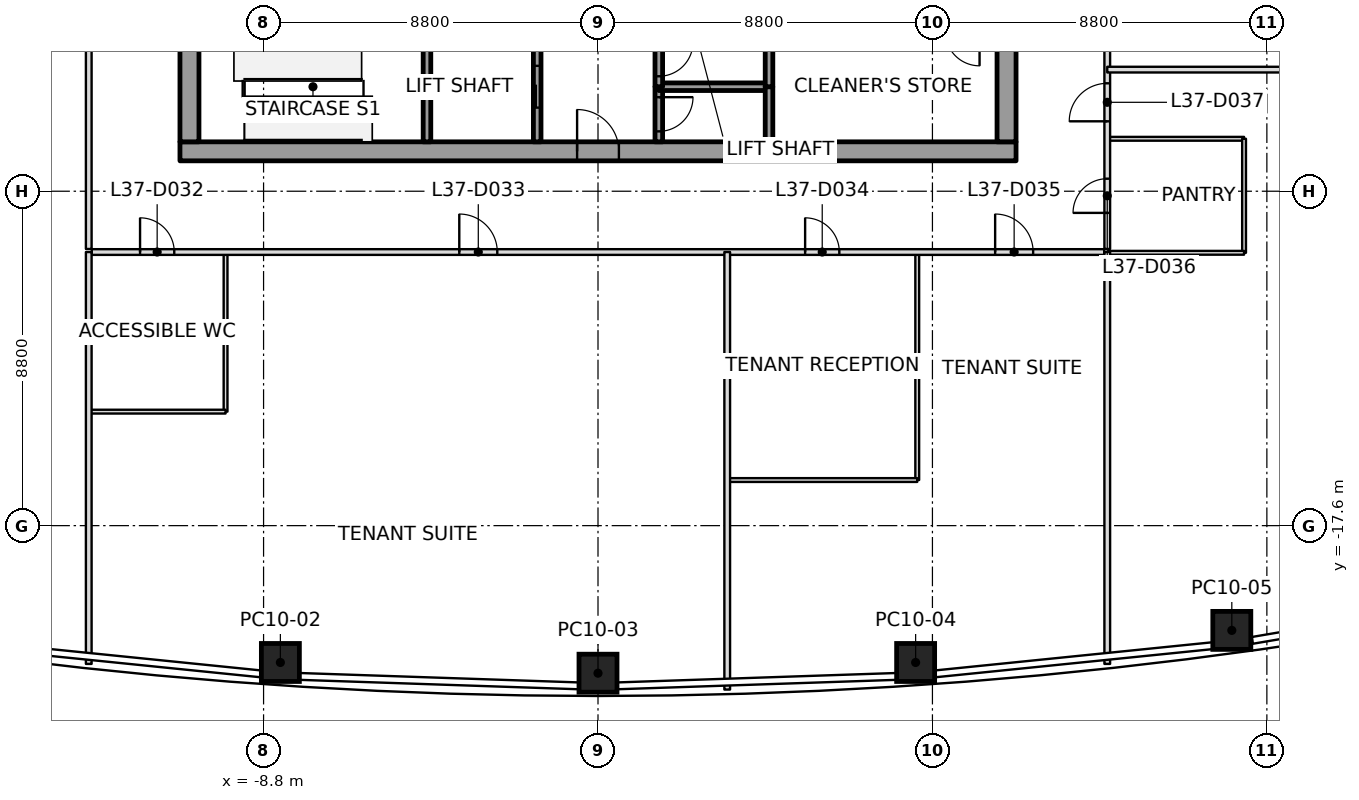
"""IFC4 building model, lengths in metres.
Left out: names, types, materials, properties, quantities, classifications, styles, units other than length and angle.
Written with IfcOpenShell. Run it as: python <this file> out.ifc"""

import sys

from ifc_helpers import new_model, si_unit, direction, frame, frame_2d, origin, origin_2d, place, context, subcontext, project, spatial, rectangle, extrude, element, fill, save


model = new_model("IFC4")
c1 = context("Model", 3, precision=1e-05, world=origin(), true_north=direction((0.0, 1.0)))
c2 = subcontext(c1, "Body", "Model", "MODEL_VIEW")
j1 = project(units=[si_unit("LENGTHUNIT", "METRE"), si_unit("PLANEANGLEUNIT", "RADIAN")], contexts=[c1])
p1 = place(None, origin())
s1 = spatial("IfcSite", under=j1, at=p1, CompositionType="ELEMENT")
p2 = place(p1, origin())
s2 = spatial("IfcBuilding", under=s1, at=p2, CompositionType="ELEMENT")
p3 = place(p2, frame((0.0, 0.0, 169.8)))
s3 = spatial("IfcBuildingStorey", under=s2, at=p3, CompositionType="ELEMENT", Elevation=169.8)
p4 = place(p3, frame((-8.358, -21.201, 0.0), z_axis=(0.008849199152, 0.01116829962, 0.999898475225), x_axis=(-0.99768763363, 0.067484561541, 0.008075868659)))
e1 = element("IfcColumn", 1, at=p4, inside=s3, PredefinedType="COLUMN", context=c2, shape_type="SweptSolid", body=[
    extrude(rectangle(XDim=1.0, YDim=1.0, at=origin_2d()), origin(), (0.0, 0.0, 1.0), 4.0),
])
p5 = place(p3, frame((0.0, -21.483, 0.0), z_axis=(0.0, 0.011473854038, 0.99993417317), x_axis=(1.0, 0.0, 0.0)))
e2 = element("IfcColumn", 2, at=p5, inside=s3, PredefinedType="COLUMN", context=c2, shape_type="SweptSolid", body=[
    extrude(rectangle(XDim=1.0, YDim=1.0, at=origin_2d()), origin(), (0.0, 0.0, 1.0), 4.0),
])
p6 = place(p3, frame((8.358, -21.201, 0.0), z_axis=(-0.008849199152, 0.01116829962, 0.999898475225), x_axis=(0.99768763363, 0.067484561541, 0.008075868659)))
e3 = element("IfcColumn", 3, at=p6, inside=s3, PredefinedType="COLUMN", context=c2, shape_type="SweptSolid", body=[
    extrude(rectangle(XDim=1.0, YDim=1.0, at=origin_2d()), origin(), (0.0, 0.0, 1.0), 4.0),
])
p7 = place(p3, frame((16.677, -20.356, 0.0), z_axis=(-0.017635456472, 0.010434820265, 0.999790030557), x_axis=(0.990763029768, 0.134648970227, 0.016070894879)))
e4 = element("IfcColumn", 4, at=p7, inside=s3, PredefinedType="COLUMN", context=c2, shape_type="SweptSolid", body=[
    extrude(rectangle(XDim=1.0, YDim=1.0, at=origin_2d()), origin(), (0.0, 0.0, 1.0), 4.001),
])
p8 = place(p3, frame((-11.0, -7.75, 0.0), z_axis=(0.0, 0.0, 1.0), x_axis=(1.0, 0.0, 0.0)))
e5 = element("IfcWall", 5, at=p8, inside=s3, PredefinedType="SHEAR", context=c2, shape_type="SweptSolid", body=[
    extrude(rectangle(XDim=22.0, YDim=0.5, at=frame_2d((11.0, 0.0))), origin(), (0.0, 0.0, 1.0), 4.0),
])
p9 = place(p8, frame((10.45, 0.0, 0.0)))
e6 = element("IfcOpeningElement", 6, at=p9, cuts=e5, PredefinedType="OPENING", context=c2, shape_type="SweptSolid", body=[
    extrude(rectangle(XDim=1.1, YDim=2.1, at=frame_2d((0.55, 1.05))), frame((0.0, 0.25, 0.0), z_axis=(0.0, -1.0, 0.0), x_axis=(1.0, 0.0, 0.0)), (0.0, 0.0, 1.0), 0.5),
])
p10 = place(p3, frame((-10.75, -7.5, 0.0), z_axis=(0.0, 0.0, 1.0), x_axis=(0.0, 1.0, 0.0)))
e7 = element("IfcWall", 7, at=p10, inside=s3, PredefinedType="SHEAR", context=c2, shape_type="SweptSolid", body=[
    extrude(rectangle(XDim=15.0, YDim=0.5, at=frame_2d((7.5, 0.0))), origin(), (0.0, 0.0, 1.0), 4.0),
])
p11 = place(p10, frame((6.6, 0.0, 0.0)))
e8 = element("IfcOpeningElement", 8, at=p11, cuts=e7, PredefinedType="OPENING", context=c2, shape_type="SweptSolid", body=[
    extrude(rectangle(XDim=1.8, YDim=2.1, at=frame_2d((0.9, 1.05))), frame((0.0, 0.25, 0.0), z_axis=(0.0, -1.0, 0.0), x_axis=(1.0, 0.0, 0.0)), (0.0, 0.0, 1.0), 0.5),
])
p12 = place(p3, frame((10.75, -7.5, 0.0), z_axis=(0.0, 0.0, 1.0), x_axis=(0.0, 1.0, 0.0)))
e9 = element("IfcWall", 9, at=p12, inside=s3, PredefinedType="SHEAR", context=c2, shape_type="SweptSolid", body=[
    extrude(rectangle(XDim=15.0, YDim=0.5, at=frame_2d((7.5, 0.0))), origin(), (0.0, 0.0, 1.0), 4.0),
])
p13 = place(p12, frame((6.6, 0.0, 0.0)))
e10 = element("IfcOpeningElement", 10, at=p13, cuts=e9, PredefinedType="OPENING", context=c2, shape_type="SweptSolid", body=[
    extrude(rectangle(XDim=1.8, YDim=2.1, at=frame_2d((0.9, 1.05))), frame((0.0, 0.25, 0.0), z_axis=(0.0, -1.0, 0.0), x_axis=(1.0, 0.0, 0.0)), (0.0, 0.0, 1.0), 0.5),
])
p14 = place(p3, frame((-4.5, -4.6, 0.0), z_axis=(0.0, 0.0, 1.0), x_axis=(0.0, -1.0, 0.0)))
e11 = element("IfcWall", 11, at=p14, inside=s3, PredefinedType="SOLIDWALL", context=c2, shape_type="SweptSolid", body=[
    extrude(rectangle(XDim=2.9, YDim=0.2, at=frame_2d((1.45, 0.0))), origin(), (0.0, 0.0, 1.0), 3.85),
])
p15 = place(p3, frame((-1.6, -7.5, 0.0), z_axis=(0.0, 0.0, 1.0), x_axis=(0.0, 1.0, 0.0)))
e12 = element("IfcWall", 12, at=p15, inside=s3, PredefinedType="SOLIDWALL", context=c2, shape_type="SweptSolid", body=[
    extrude(rectangle(XDim=2.9, YDim=0.2, at=frame_2d((1.45, 0.0))), origin(), (0.0, 0.0, 1.0), 3.85),
])
p16 = place(p15, frame((0.9, 0.0, 0.0)))
e13 = element("IfcOpeningElement", 13, at=p16, cuts=e12, PredefinedType="OPENING", context=c2, shape_type="SweptSolid", body=[
    extrude(rectangle(XDim=1.1, YDim=2.1, at=frame_2d((0.55, 1.05))), frame((0.0, 0.1, 0.0), z_axis=(0.0, -1.0, 0.0), x_axis=(1.0, 0.0, 0.0)), (0.0, 0.0, 1.0), 0.2),
])
p17 = place(p3, frame((1.6, -6.05, 0.0), z_axis=(0.0, 0.0, 1.0), x_axis=(0.0, -1.0, 0.0)))
e14 = element("IfcWall", 14, at=p17, inside=s3, PredefinedType="SOLIDWALL", context=c2, shape_type="SweptSolid", body=[
    extrude(rectangle(XDim=1.45, YDim=0.2, at=frame_2d((0.725, 0.0))), origin(), (0.0, 0.0, 1.0), 3.85),
])
p18 = place(p17, frame((0.275, 0.0, 0.0)))
e15 = element("IfcOpeningElement", 15, at=p18, cuts=e14, PredefinedType="OPENING", context=c2, shape_type="SweptSolid", body=[
    extrude(rectangle(XDim=0.9, YDim=2.1, at=frame_2d((0.45, 1.05))), frame((0.0, 0.1, 0.0), z_axis=(0.0, -1.0, 0.0), x_axis=(1.0, 0.0, 0.0)), (0.0, 0.0, 1.0), 0.2),
])
p19 = place(p3, frame((4.5, -6.05, 0.0), z_axis=(0.0, 0.0, 1.0), x_axis=(-1.0, 0.0, 0.0)))
e16 = element("IfcWall", 16, at=p19, inside=s3, PredefinedType="SOLIDWALL", context=c2, shape_type="SweptSolid", body=[
    extrude(rectangle(XDim=2.9, YDim=0.2, at=frame_2d((1.45, 0.0))), origin(), (0.0, 0.0, 1.0), 3.85),
])
p20 = place(p3, frame((1.6, -4.6, 0.0), z_axis=(0.0, 0.0, 1.0), x_axis=(0.0, -1.0, 0.0)))
e17 = element("IfcWall", 17, at=p20, inside=s3, PredefinedType="SOLIDWALL", context=c2, shape_type="SweptSolid", body=[
    extrude(rectangle(XDim=1.45, YDim=0.2, at=frame_2d((0.725, 0.0))), origin(), (0.0, 0.0, 1.0), 3.85),
])
p21 = place(p20, frame((0.275, 0.0, 0.0)))
e18 = element("IfcOpeningElement", 18, at=p21, cuts=e17, PredefinedType="OPENING", context=c2, shape_type="SweptSolid", body=[
    extrude(rectangle(XDim=0.9, YDim=2.1, at=frame_2d((0.45, 1.05))), frame((0.0, 0.1, 0.0), z_axis=(0.0, -1.0, 0.0), x_axis=(1.0, 0.0, 0.0)), (0.0, 0.0, 1.0), 0.2),
])
for number, where, z_axis, x_axis in (
    (19, (4.5, -6.05, 0.0), (0.0, 0.0, 1.0), (0.0, -1.0, 0.0)),
    (20, (4.5, -4.6, 0.0), (0.0, 0.0, 1.0), (0.0, -1.0, 0.0)),
):
    element("IfcWall", number, at=place(p3, frame(where, z_axis=z_axis, x_axis=x_axis)), inside=s3, PredefinedType="SOLIDWALL", context=c2, shape_type="SweptSolid", body=[
        extrude(rectangle(XDim=1.45, YDim=0.2, at=frame_2d((0.725, 0.0))), origin(), (0.0, 0.0, 1.0), 3.85),
    ])
p22 = place(p3, frame((-13.4, -10.4, 0.0), z_axis=(0.0, 0.0, 1.0), x_axis=(0.0, -1.0, 0.0)))
e21 = element("IfcWall", 21, at=p22, inside=s3, PredefinedType="PARTITIONING", context=c2, shape_type="SweptSolid", body=[
    extrude(rectangle(XDim=10.839, YDim=0.15, at=frame_2d((5.419, 0.0))), origin(), (0.0, 0.0, 1.0), 3.234),
])
p23 = place(p3, frame((3.4, -10.4, 0.0), z_axis=(0.0, 0.0, 1.0), x_axis=(0.0, -1.0, 0.0)))
e22 = element("IfcWall", 22, at=p23, inside=s3, PredefinedType="PARTITIONING", context=c2, shape_type="SweptSolid", body=[
    extrude(rectangle(XDim=11.514, YDim=0.15, at=frame_2d((5.757, 0.0))), origin(), (0.0, 0.0, 1.0), 3.234),
])
p24 = place(p3, frame((13.4, -10.4, 0.0), z_axis=(0.0, 0.0, 1.0), x_axis=(0.0, -1.0, 0.0)))
e23 = element("IfcWall", 23, at=p24, inside=s3, PredefinedType="PARTITIONING", context=c2, shape_type="SweptSolid", body=[
    extrude(rectangle(XDim=10.839, YDim=0.15, at=frame_2d((5.419, 0.0))), origin(), (0.0, 0.0, 1.0), 3.234),
])
p25 = place(p3, frame((27.018, -5.6, 0.0), z_axis=(0.0, 0.0, 1.0), x_axis=(-1.0, 0.0, 0.0)))
e24 = element("IfcWall", 24, at=p25, inside=s3, PredefinedType="PARTITIONING", context=c2, shape_type="SweptSolid", body=[
    extrude(rectangle(XDim=13.618, YDim=0.15, at=frame_2d((6.809, 0.0))), origin(), (0.0, 0.0, 1.0), 3.234),
])
p26 = place(p3, frame((-13.4, 10.32, 0.0), z_axis=(0.0, 0.0, 1.0), x_axis=(0.0, -1.0, 0.0)))
e25 = element("IfcWall", 25, at=p26, inside=s3, PredefinedType="PARTITIONING", context=c2, shape_type="SweptSolid", body=[
    extrude(rectangle(XDim=20.64, YDim=0.15, at=frame_2d((10.32, 0.0))), origin(), (0.0, 0.0, 1.0), 3.166),
])
p27 = place(p26, frame((1.57, 0.0, 0.0)))
e26 = element("IfcOpeningElement", 26, at=p27, cuts=e25, PredefinedType="OPENING", context=c2, shape_type="SweptSolid", body=[
    extrude(rectangle(XDim=0.9, YDim=2.1, at=frame_2d((0.45, 1.05))), frame((0.0, 0.075, 0.0), z_axis=(0.0, -1.0, 0.0), x_axis=(1.0, 0.0, 0.0)), (0.0, 0.0, 1.0), 0.15),
])
p28 = place(p26, frame((11.98, 0.0, 0.0)))
e27 = element("IfcOpeningElement", 27, at=p28, cuts=e25, PredefinedType="OPENING", context=c2, shape_type="SweptSolid", body=[
    extrude(rectangle(XDim=1.0, YDim=2.1, at=frame_2d((0.5, 1.05))), frame((0.0, 0.075, 0.0), z_axis=(0.0, -1.0, 0.0), x_axis=(1.0, 0.0, 0.0)), (0.0, 0.0, 1.0), 0.15),
])
p29 = place(p3, frame((-13.32, -10.4, 0.0), z_axis=(0.0, 0.0, 1.0), x_axis=(1.0, 0.0, 0.0)))
e28 = element("IfcWall", 28, at=p29, inside=s3, PredefinedType="PARTITIONING", context=c2, shape_type="SweptSolid", body=[
    extrude(rectangle(XDim=26.64, YDim=0.15, at=frame_2d((13.32, 0.0))), origin(), (0.0, 0.0, 1.0), 3.3),
])
p30 = place(p29, frame((1.27, 0.0, 0.0)))
e29 = element("IfcOpeningElement", 29, at=p30, cuts=e28, PredefinedType="OPENING", context=c2, shape_type="SweptSolid", body=[
    extrude(rectangle(XDim=0.9, YDim=2.1, at=frame_2d((0.45, 1.05))), frame((0.0, 0.075, 0.0), z_axis=(0.0, -1.0, 0.0), x_axis=(1.0, 0.0, 0.0)), (0.0, 0.0, 1.0), 0.15),
])
p31 = place(p29, frame((9.67, 0.0, 0.0)))
e30 = element("IfcOpeningElement", 30, at=p31, cuts=e28, PredefinedType="OPENING", context=c2, shape_type="SweptSolid", body=[
    extrude(rectangle(XDim=1.0, YDim=2.1, at=frame_2d((0.5, 1.05))), frame((0.0, 0.075, 0.0), z_axis=(0.0, -1.0, 0.0), x_axis=(1.0, 0.0, 0.0)), (0.0, 0.0, 1.0), 0.15),
])
p32 = place(p29, frame((18.77, 0.0, 0.0)))
e31 = element("IfcOpeningElement", 31, at=p32, cuts=e28, PredefinedType="OPENING", context=c2, shape_type="SweptSolid", body=[
    extrude(rectangle(XDim=0.9, YDim=2.1, at=frame_2d((0.45, 1.05))), frame((0.0, 0.075, 0.0), z_axis=(0.0, -1.0, 0.0), x_axis=(1.0, 0.0, 0.0)), (0.0, 0.0, 1.0), 0.15),
])
p33 = place(p29, frame((23.77, 0.0, 0.0)))
e32 = element("IfcOpeningElement", 32, at=p33, cuts=e28, PredefinedType="OPENING", context=c2, shape_type="SweptSolid", body=[
    extrude(rectangle(XDim=1.0, YDim=2.1, at=frame_2d((0.5, 1.05))), frame((0.0, 0.075, 0.0), z_axis=(0.0, -1.0, 0.0), x_axis=(1.0, 0.0, 0.0)), (0.0, 0.0, 1.0), 0.15),
])
p34 = place(p3, frame((13.4, -10.32, 0.0), z_axis=(0.0, 0.0, 1.0), x_axis=(0.0, 1.0, 0.0)))
e33 = element("IfcWall", 33, at=p34, inside=s3, PredefinedType="PARTITIONING", context=c2, shape_type="SweptSolid", body=[
    extrude(rectangle(XDim=20.64, YDim=0.15, at=frame_2d((10.32, 0.0))), origin(), (0.0, 0.0, 1.0), 3.166),
])
p35 = place(p34, frame((6.37, 0.0, 0.0)))
e34 = element("IfcOpeningElement", 34, at=p35, cuts=e33, PredefinedType="OPENING", context=c2, shape_type="SweptSolid", body=[
    extrude(rectangle(XDim=0.9, YDim=2.1, at=frame_2d((0.45, 1.05))), frame((0.0, 0.075, 0.0), z_axis=(0.0, -1.0, 0.0), x_axis=(1.0, 0.0, 0.0)), (0.0, 0.0, 1.0), 0.15),
])
p36 = place(p34, frame((14.37, 0.0, 0.0)))
e35 = element("IfcOpeningElement", 35, at=p36, cuts=e33, PredefinedType="OPENING", context=c2, shape_type="SweptSolid", body=[
    extrude(rectangle(XDim=1.0, YDim=2.1, at=frame_2d((0.5, 1.05))), frame((0.0, 0.075, 0.0), z_axis=(0.0, -1.0, 0.0), x_axis=(1.0, 0.0, 0.0)), (0.0, 0.0, 1.0), 0.15),
])
p37 = place(p34, frame((0.95, 0.0, 0.0)))
e36 = element("IfcOpeningElement", 36, at=p37, cuts=e33, PredefinedType="OPENING", context=c2, shape_type="SweptSolid", body=[
    extrude(rectangle(XDim=0.9, YDim=2.1, at=frame_2d((0.45, 1.05))), frame((0.0, 0.075, 0.0), z_axis=(0.0, -1.0, 0.0), x_axis=(1.0, 0.0, 0.0)), (0.0, 0.0, 1.0), 0.15),
])
p38 = place(p34, frame((3.36, 0.0, 0.0)))
e37 = element("IfcOpeningElement", 37, at=p38, cuts=e33, PredefinedType="OPENING", context=c2, shape_type="SweptSolid", body=[
    extrude(rectangle(XDim=1.0, YDim=2.1, at=frame_2d((0.5, 1.05))), frame((0.0, 0.075, 0.0), z_axis=(0.0, -1.0, 0.0), x_axis=(1.0, 0.0, 0.0)), (0.0, 0.0, 1.0), 0.15),
])
p39 = place(p3, frame((-9.8, -10.43, 0.0), z_axis=(0.0, 0.0, 1.0), x_axis=(0.0, -1.0, 0.0)))
e38 = element("IfcWall", 38, at=p39, inside=s3, PredefinedType="PARTITIONING", context=c2, shape_type="SweptSolid", body=[
    extrude(rectangle(XDim=4.17, YDim=0.1, at=frame_2d((2.085, 0.0))), origin(), (0.0, 0.0, 1.0), 3.3),
])
p40 = place(p3, frame((-9.8, -14.6, 0.0), z_axis=(0.0, 0.0, 1.0), x_axis=(-1.0, 0.0, 0.0)))
e39 = element("IfcWall", 39, at=p40, inside=s3, PredefinedType="PARTITIONING", context=c2, shape_type="SweptSolid", body=[
    extrude(rectangle(XDim=3.57, YDim=0.1, at=frame_2d((1.785, 0.0))), origin(), (0.0, 0.0, 1.0), 3.3),
])
p41 = place(p3, frame((8.4, -10.43, 0.0), z_axis=(0.0, 0.0, 1.0), x_axis=(0.0, -1.0, 0.0)))
e40 = element("IfcWall", 40, at=p41, inside=s3, PredefinedType="PARTITIONING", context=c2, shape_type="SweptSolid", body=[
    extrude(rectangle(XDim=5.97, YDim=0.1, at=frame_2d((2.985, 0.0))), origin(), (0.0, 0.0, 1.0), 3.3),
])
p42 = place(p3, frame((8.4, -16.4, 0.0), z_axis=(0.0, 0.0, 1.0), x_axis=(-1.0, 0.0, 0.0)))
e41 = element("IfcWall", 41, at=p42, inside=s3, PredefinedType="PARTITIONING", context=c2, shape_type="SweptSolid", body=[
    extrude(rectangle(XDim=4.97, YDim=0.1, at=frame_2d((2.485, 0.0))), origin(), (0.0, 0.0, 1.0), 3.3),
])
p43 = place(p3, frame((13.43, -7.42, 0.0), z_axis=(0.0, 0.0, 1.0), x_axis=(1.0, 0.0, 0.0)))
e42 = element("IfcWall", 42, at=p43, inside=s3, PredefinedType="PARTITIONING", context=c2, shape_type="SweptSolid", body=[
    extrude(rectangle(XDim=3.57, YDim=0.1, at=frame_2d((1.785, 0.0))), origin(), (0.0, 0.0, 1.0), 3.3),
])
p44 = place(p3, frame((17.0, -7.42, 0.0), z_axis=(0.0, 0.0, 1.0), x_axis=(0.0, -1.0, 0.0)))
e43 = element("IfcWall", 43, at=p44, inside=s3, PredefinedType="PARTITIONING", context=c2, shape_type="SweptSolid", body=[
    extrude(rectangle(XDim=3.0, YDim=0.1, at=frame_2d((1.5, 0.0))), origin(), (0.0, 0.0, 1.0), 3.3),
])
p45 = place(p3, frame((17.0, -10.42, 0.0), z_axis=(0.0, 0.0, 1.0), x_axis=(-1.0, 0.0, 0.0)))
e44 = element("IfcWall", 44, at=p45, inside=s3, PredefinedType="PARTITIONING", context=c2, shape_type="SweptSolid", body=[
    extrude(rectangle(XDim=3.57, YDim=0.1, at=frame_2d((1.785, 0.0))), origin(), (0.0, 0.0, 1.0), 3.166),
])
p46 = place(p30, origin())
e45 = element("IfcDoor", 45, at=p46, inside=s3, OperationType="SINGLE_SWING_RIGHT", PredefinedType="DOOR", context=c2, shape_type="SweptSolid", body=[
    extrude(rectangle(XDim=0.9, YDim=2.1, at=frame_2d((0.45, 1.05))), frame((0.0, 0.025, 0.0), z_axis=(0.0, -1.0, 0.0), x_axis=(1.0, 0.0, 0.0)), (0.0, 0.0, 1.0), 0.05),
])
fill(e29, e45)
p47 = place(p31, origin())
e46 = element("IfcDoor", 46, at=p47, inside=s3, OperationType="SINGLE_SWING_RIGHT", PredefinedType="DOOR", context=c2, shape_type="SweptSolid", body=[
    extrude(rectangle(XDim=1.0, YDim=2.1, at=frame_2d((0.5, 1.05))), frame((0.0, 0.025, 0.0), z_axis=(0.0, -1.0, 0.0), x_axis=(1.0, 0.0, 0.0)), (0.0, 0.0, 1.0), 0.05),
])
fill(e30, e46)
p48 = place(p32, origin())
e47 = element("IfcDoor", 47, at=p48, inside=s3, OperationType="SINGLE_SWING_LEFT", PredefinedType="DOOR", context=c2, shape_type="SweptSolid", body=[
    extrude(rectangle(XDim=0.9, YDim=2.1, at=frame_2d((0.45, 1.05))), frame((0.0, 0.025, 0.0), z_axis=(0.0, -1.0, 0.0), x_axis=(1.0, 0.0, 0.0)), (0.0, 0.0, 1.0), 0.05),
])
fill(e31, e47)
p49 = place(p33, origin())
e48 = element("IfcDoor", 48, at=p49, inside=s3, OperationType="SINGLE_SWING_LEFT", PredefinedType="DOOR", context=c2, shape_type="SweptSolid", body=[
    extrude(rectangle(XDim=1.0, YDim=2.1, at=frame_2d((0.5, 1.05))), frame((0.0, 0.025, 0.0), z_axis=(0.0, -1.0, 0.0), x_axis=(1.0, 0.0, 0.0)), (0.0, 0.0, 1.0), 0.05),
])
fill(e32, e48)
p50 = place(p37, origin())
e49 = element("IfcDoor", 49, at=p50, inside=s3, OperationType="SINGLE_SWING_LEFT", PredefinedType="DOOR", context=c2, shape_type="SweptSolid", body=[
    extrude(rectangle(XDim=0.9, YDim=2.1, at=frame_2d((0.45, 1.05))), frame((0.0, 0.025, 0.0), z_axis=(0.0, -1.0, 0.0), x_axis=(1.0, 0.0, 0.0)), (0.0, 0.0, 1.0), 0.05),
])
fill(e36, e49)
p51 = place(p38, origin())
e50 = element("IfcDoor", 50, at=p51, inside=s3, OperationType="SINGLE_SWING_LEFT", PredefinedType="DOOR", context=c2, shape_type="SweptSolid", body=[
    extrude(rectangle(XDim=1.0, YDim=2.1, at=frame_2d((0.5, 1.05))), frame((0.0, 0.025, 0.0), z_axis=(0.0, -1.0, 0.0), x_axis=(1.0, 0.0, 0.0)), (0.0, 0.0, 1.0), 0.05),
])
fill(e37, e50)
p52 = place(p16, origin())
e51 = element("IfcDoor", 51, at=p52, inside=s3, OperationType="SLIDING_TO_LEFT", PredefinedType="DOOR", context=c2, shape_type="SweptSolid", body=[
    extrude(rectangle(XDim=1.1, YDim=2.1, at=frame_2d((0.55, 1.05))), frame((0.0, 0.025, 0.0), z_axis=(0.0, -1.0, 0.0), x_axis=(1.0, 0.0, 0.0)), (0.0, 0.0, 1.0), 0.05),
])
fill(e13, e51)
p53 = place(p18, origin())
e52 = element("IfcDoor", 52, at=p53, inside=s3, OperationType="SINGLE_SWING_LEFT", PredefinedType="DOOR", context=c2, shape_type="SweptSolid", body=[
    extrude(rectangle(XDim=0.9, YDim=2.1, at=frame_2d((0.45, 1.05))), frame((0.0, 0.025, 0.0), z_axis=(0.0, -1.0, 0.0), x_axis=(1.0, 0.0, 0.0)), (0.0, 0.0, 1.0), 0.05),
])
fill(e15, e52)
p54 = place(p21, origin())
e53 = element("IfcDoor", 53, at=p54, inside=s3, OperationType="SINGLE_SWING_LEFT", PredefinedType="DOOR", context=c2, shape_type="SweptSolid", body=[
    extrude(rectangle(XDim=0.9, YDim=2.1, at=frame_2d((0.45, 1.05))), frame((0.0, 0.025, 0.0), z_axis=(0.0, -1.0, 0.0), x_axis=(1.0, 0.0, 0.0)), (0.0, 0.0, 1.0), 0.05),
])
fill(e18, e53)
p55 = place(p9, origin())
e54 = element("IfcDoor", 54, at=p55, inside=s3, OperationType="SINGLE_SWING_RIGHT", PredefinedType="DOOR", context=c2, shape_type="SweptSolid", body=[
    extrude(rectangle(XDim=1.1, YDim=2.1, at=frame_2d((0.55, 1.05))), frame((0.0, 0.025, 0.0), z_axis=(0.0, -1.0, 0.0), x_axis=(1.0, 0.0, 0.0)), (0.0, 0.0, 1.0), 0.05),
])
fill(e6, e54)
save(model, sys.argv[1])
